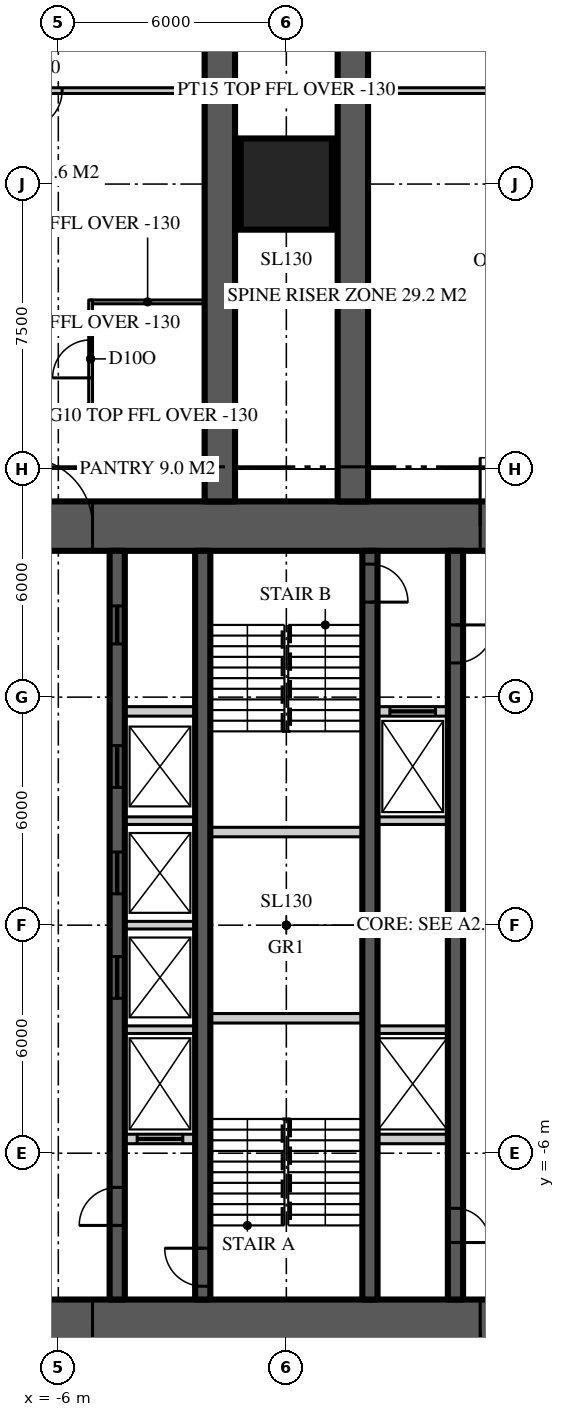
"""IFC4 building model, lengths in metres.
Left out: names, types, materials, properties, quantities, classifications, styles, units other than length and angle.
Written with IfcOpenShell. Run it as: python <this file> out.ifc"""

import sys

from ifc_helpers import new_model, si_unit, direction, frame, frame_2d, origin, origin_2d, place, context, subcontext, project, spatial, rectangle, extrude, element, fill, save


model = new_model("IFC4")
c1 = context("Model", 3, precision=1e-05, world=origin(), true_north=direction((0.0, 1.0)))
c2 = subcontext(c1, "Body", "Model", "MODEL_VIEW")
j1 = project(units=[si_unit("LENGTHUNIT", "METRE"), si_unit("PLANEANGLEUNIT", "RADIAN")], contexts=[c1])
p1 = place(None, origin())
s1 = spatial("IfcSite", under=j1, at=p1, CompositionType="ELEMENT")
p2 = place(p1, origin())
s2 = spatial("IfcBuilding", under=s1, at=p2, CompositionType="ELEMENT")
p3 = place(p2, frame((0.0, 0.0, 159.3)))
s3 = spatial("IfcBuildingStorey", under=s2, at=p3, CompositionType="ELEMENT", Elevation=159.3)
p4 = place(p3, frame((-11.15, 10.5, 0.0), z_axis=(0.0, 0.0, 1.0), x_axis=(1.0, 0.0, 0.0)))
e1 = element("IfcWall", 1, at=p4, inside=s3, PredefinedType="SHEAR", context=c2, shape_type="SweptSolid", body=[
    extrude(rectangle(XDim=22.3, YDim=1.3, at=frame_2d((11.15, 0.0))), origin(), (0.0, 0.0, 1.0), 3.9),
])
p5 = place(p4, frame((4.25, 0.0, 0.0)))
e2 = element("IfcOpeningElement", 2, at=p5, cuts=e1, PredefinedType="OPENING", context=c2, shape_type="SweptSolid", body=[
    extrude(rectangle(XDim=1.8, YDim=2.2, at=frame_2d((0.9, 1.1))), frame((0.0, 0.66, 0.0), z_axis=(0.0, -1.0, 0.0), x_axis=(1.0, 0.0, 0.0)), (0.0, 0.0, 1.0), 1.32),
])
p6 = place(p4, frame((16.25, 0.0, 0.0)))
e3 = element("IfcOpeningElement", 3, at=p6, cuts=e1, PredefinedType="OPENING", context=c2, shape_type="SweptSolid", body=[
    extrude(rectangle(XDim=1.8, YDim=2.2, at=frame_2d((0.9, 1.1))), frame((0.0, 0.66, 0.0), z_axis=(0.0, -1.0, 0.0), x_axis=(1.0, 0.0, 0.0)), (0.0, 0.0, 1.0), 1.32),
])
p7 = place(p3, frame((11.15, -10.5, 0.0), z_axis=(0.0, 0.0, 1.0), x_axis=(-1.0, 0.0, 0.0)))
e4 = element("IfcWall", 4, at=p7, inside=s3, PredefinedType="SHEAR", context=c2, shape_type="SweptSolid", body=[
    extrude(rectangle(XDim=22.3, YDim=1.3, at=frame_2d((11.15, 0.0))), origin(), (0.0, 0.0, 1.0), 3.9),
])
p8 = place(p7, frame((16.25, 0.0, 0.0)))
e5 = element("IfcOpeningElement", 5, at=p8, cuts=e4, PredefinedType="OPENING", context=c2, shape_type="SweptSolid", body=[
    extrude(rectangle(XDim=1.8, YDim=2.2, at=frame_2d((0.9, 1.1))), frame((0.0, 0.66, 0.0), z_axis=(0.0, -1.0, 0.0), x_axis=(1.0, 0.0, 0.0)), (0.0, 0.0, 1.0), 1.32),
])
p9 = place(p7, frame((4.25, 0.0, 0.0)))
e6 = element("IfcOpeningElement", 6, at=p9, cuts=e4, PredefinedType="OPENING", context=c2, shape_type="SweptSolid", body=[
    extrude(rectangle(XDim=1.8, YDim=2.2, at=frame_2d((0.9, 1.1))), frame((0.0, 0.66, 0.0), z_axis=(0.0, -1.0, 0.0), x_axis=(1.0, 0.0, 0.0)), (0.0, 0.0, 1.0), 1.32),
])
for number, where, z_axis, x_axis in (
    (7, (1.75, 11.15, 0.0), (0.0, 0.0, 1.0), (0.0, 1.0, 0.0)),
    (8, (-1.75, 11.15, 0.0), (0.0, 0.0, 1.0), (0.0, 1.0, 0.0)),
):
    element("IfcWall", number, at=place(p3, frame(where, z_axis=z_axis, x_axis=x_axis)), inside=s3, PredefinedType="SHEAR", context=c2, shape_type="SweptSolid", body=[
        extrude(rectangle(XDim=15.25, YDim=0.8, at=frame_2d((7.625, 0.0))), origin(), (0.0, 0.0, 1.0), 3.9),
    ])
p10 = place(p3, frame((0.0, 19.5, 0.0), z_axis=(0.0, 0.0, 1.0), x_axis=(1.0, 0.0, 0.0)))
e9 = element("IfcColumn", 9, at=p10, inside=s3, PredefinedType="COLUMN", context=c2, shape_type="SweptSolid", body=[
    extrude(rectangle(XDim=2.4, YDim=2.4, at=origin_2d()), origin(), (0.0, 0.0, 1.0), 3.9),
])
p11 = place(p3, frame((-4.45, -9.85, 0.0), z_axis=(0.0, 0.0, 1.0), x_axis=(0.0, 1.0, 0.0)))
e10 = element("IfcWall", 10, at=p11, inside=s3, PredefinedType="SHEAR", context=c2, shape_type="SweptSolid", body=[
    extrude(rectangle(XDim=19.7, YDim=0.4, at=frame_2d((9.85, 0.0))), origin(), (0.0, 0.0, 1.0), 3.9),
])
p12 = place(p11, frame((1.95, 0.0, 0.0)))
e11 = element("IfcOpeningElement", 11, at=p12, cuts=e10, PredefinedType="OPENING", context=c2, shape_type="SweptSolid", body=[
    extrude(rectangle(XDim=1.0, YDim=2.2, at=frame_2d((0.5, 1.1))), frame((0.0, 0.21, 0.0), z_axis=(0.0, -1.0, 0.0), x_axis=(1.0, 0.0, 0.0)), (0.0, 0.0, 1.0), 0.42),
])
p13 = place(p11, frame((17.25, 0.0, 0.0)))
e12 = element("IfcOpeningElement", 12, at=p13, cuts=e10, PredefinedType="OPENING", context=c2, shape_type="SweptSolid", body=[
    extrude(rectangle(XDim=1.0, YDim=2.1, at=frame_2d((0.5, 1.05))), frame((0.0, 0.21, 0.0), z_axis=(0.0, -1.0, 0.0), x_axis=(1.0, 0.0, 0.0)), (0.0, 0.0, 1.0), 0.42),
])
p14 = place(p11, frame((7.925, 0.0, 0.0)))
e13 = element("IfcOpeningElement", 13, at=p14, cuts=e10, PredefinedType="OPENING", context=c2, shape_type="SweptSolid", body=[
    extrude(rectangle(XDim=1.1, YDim=2.2, at=frame_2d((0.55, 1.1))), frame((0.0, 0.21, 0.0), z_axis=(0.0, -1.0, 0.0), x_axis=(1.0, 0.0, 0.0)), (0.0, 0.0, 1.0), 0.42),
])
p15 = place(p11, frame((10.675, 0.0, 0.0)))
e14 = element("IfcOpeningElement", 14, at=p15, cuts=e10, PredefinedType="OPENING", context=c2, shape_type="SweptSolid", body=[
    extrude(rectangle(XDim=1.1, YDim=2.2, at=frame_2d((0.55, 1.1))), frame((0.0, 0.21, 0.0), z_axis=(0.0, -1.0, 0.0), x_axis=(1.0, 0.0, 0.0)), (0.0, 0.0, 1.0), 0.42),
])
p16 = place(p11, frame((13.475, 0.0, 0.0)))
e15 = element("IfcOpeningElement", 15, at=p16, cuts=e10, PredefinedType="OPENING", context=c2, shape_type="SweptSolid", body=[
    extrude(rectangle(XDim=1.1, YDim=2.2, at=frame_2d((0.55, 1.1))), frame((0.0, 0.21, 0.0), z_axis=(0.0, -1.0, 0.0), x_axis=(1.0, 0.0, 0.0)), (0.0, 0.0, 1.0), 0.42),
])
p17 = place(p3, frame((4.45, 9.85, 0.0), z_axis=(0.0, 0.0, 1.0), x_axis=(0.0, -1.0, 0.0)))
e16 = element("IfcWall", 16, at=p17, inside=s3, PredefinedType="SHEAR", context=c2, shape_type="SweptSolid", body=[
    extrude(rectangle(XDim=19.7, YDim=0.4, at=frame_2d((9.85, 0.0))), origin(), (0.0, 0.0, 1.0), 3.9),
])
p18 = place(p17, frame((1.95, 0.0, 0.0)))
e17 = element("IfcOpeningElement", 17, at=p18, cuts=e16, PredefinedType="OPENING", context=c2, shape_type="SweptSolid", body=[
    extrude(rectangle(XDim=1.0, YDim=2.2, at=frame_2d((0.5, 1.1))), frame((0.0, 0.21, 0.0), z_axis=(0.0, -1.0, 0.0), x_axis=(1.0, 0.0, 0.0)), (0.0, 0.0, 1.0), 0.42),
])
p19 = place(p17, frame((17.3, 0.0, 0.0)))
e18 = element("IfcOpeningElement", 18, at=p19, cuts=e16, PredefinedType="OPENING", context=c2, shape_type="SweptSolid", body=[
    extrude(rectangle(XDim=0.9, YDim=2.1, at=frame_2d((0.45, 1.05))), frame((0.0, 0.21, 0.0), z_axis=(0.0, -1.0, 0.0), x_axis=(1.0, 0.0, 0.0)), (0.0, 0.0, 1.0), 0.42),
])
p20 = place(p3, frame((-2.2, -9.85, 0.0), z_axis=(0.0, 0.0, 1.0), x_axis=(0.0, 1.0, 0.0)))
e19 = element("IfcWall", 19, at=p20, inside=s3, PredefinedType="SHEAR", context=c2, shape_type="SweptSolid", body=[
    extrude(rectangle(XDim=19.7, YDim=0.4, at=frame_2d((9.85, 0.0))), origin(), (0.0, 0.0, 1.0), 3.9),
])
p21 = place(p20, frame((0.35, 0.0, 0.0)))
e20 = element("IfcOpeningElement", 20, at=p21, cuts=e19, PredefinedType="OPENING", context=c2, shape_type="SweptSolid", body=[
    extrude(rectangle(XDim=1.0, YDim=2.2, at=frame_2d((0.5, 1.1))), frame((0.0, 0.21, 0.0), z_axis=(0.0, -1.0, 0.0), x_axis=(1.0, 0.0, 0.0)), (0.0, 0.0, 1.0), 0.42),
])
p22 = place(p3, frame((2.2, 9.85, 0.0), z_axis=(0.0, 0.0, 1.0), x_axis=(0.0, -1.0, 0.0)))
e21 = element("IfcWall", 21, at=p22, inside=s3, PredefinedType="SHEAR", context=c2, shape_type="SweptSolid", body=[
    extrude(rectangle(XDim=19.7, YDim=0.4, at=frame_2d((9.85, 0.0))), origin(), (0.0, 0.0, 1.0), 3.9),
])
p23 = place(p22, frame((0.35, 0.0, 0.0)))
e22 = element("IfcOpeningElement", 22, at=p23, cuts=e21, PredefinedType="OPENING", context=c2, shape_type="SweptSolid", body=[
    extrude(rectangle(XDim=1.0, YDim=2.2, at=frame_2d((0.5, 1.1))), frame((0.0, 0.21, 0.0), z_axis=(0.0, -1.0, 0.0), x_axis=(1.0, 0.0, 0.0)), (0.0, 0.0, 1.0), 0.42),
])
p24 = place(p3, frame((-4.25, 5.625, 0.0), z_axis=(0.0, 0.0, 1.0), x_axis=(1.0, 0.0, 0.0)))
e23 = element("IfcWall", 23, at=p24, inside=s3, PredefinedType="SOLIDWALL", context=c2, shape_type="SweptSolid", body=[
    extrude(rectangle(XDim=1.85, YDim=0.25, at=frame_2d((0.925, 0.0))), origin(), (0.0, 0.0, 1.0), 3.7),
])
p25 = place(p3, frame((2.4, 5.625, 0.0), z_axis=(0.0, 0.0, 1.0), x_axis=(1.0, 0.0, 0.0)))
e24 = element("IfcWall", 24, at=p25, inside=s3, PredefinedType="SOLIDWALL", context=c2, shape_type="SweptSolid", body=[
    extrude(rectangle(XDim=1.85, YDim=0.25, at=frame_2d((0.925, 0.0))), origin(), (0.0, 0.0, 1.0), 3.7),
])
p26 = place(p25, frame((0.325, 0.0, 0.0)))
e25 = element("IfcOpeningElement", 25, at=p26, cuts=e24, PredefinedType="OPENING", context=c2, shape_type="SweptSolid", body=[
    extrude(rectangle(XDim=1.2, YDim=2.2, at=frame_2d((0.6, 1.1))), frame((0.0, 0.135, 0.0), z_axis=(0.0, -1.0, 0.0), x_axis=(1.0, 0.0, 0.0)), (0.0, 0.0, 1.0), 0.27),
])
p27 = place(p3, frame((-4.25, -5.625, 0.0), z_axis=(0.0, 0.0, 1.0), x_axis=(1.0, 0.0, 0.0)))
e26 = element("IfcWall", 26, at=p27, inside=s3, PredefinedType="SOLIDWALL", context=c2, shape_type="SweptSolid", body=[
    extrude(rectangle(XDim=1.85, YDim=0.25, at=frame_2d((0.925, 0.0))), origin(), (0.0, 0.0, 1.0), 3.7),
])
p28 = place(p27, frame((0.325, 0.0, 0.0)))
e27 = element("IfcOpeningElement", 27, at=p28, cuts=e26, PredefinedType="OPENING", context=c2, shape_type="SweptSolid", body=[
    extrude(rectangle(XDim=1.2, YDim=2.2, at=frame_2d((0.6, 1.1))), frame((0.0, 0.135, 0.0), z_axis=(0.0, -1.0, 0.0), x_axis=(1.0, 0.0, 0.0)), (0.0, 0.0, 1.0), 0.27),
])
p29 = place(p3, frame((2.4, -5.625, 0.0), z_axis=(0.0, 0.0, 1.0), x_axis=(1.0, 0.0, 0.0)))
e28 = element("IfcWall", 28, at=p29, inside=s3, PredefinedType="SOLIDWALL", context=c2, shape_type="SweptSolid", body=[
    extrude(rectangle(XDim=1.85, YDim=0.25, at=frame_2d((0.925, 0.0))), origin(), (0.0, 0.0, 1.0), 3.7),
])
for number, where, z_axis, x_axis in (
    (29, (-2.0, -2.45, 0.0), (0.0, 0.0, 1.0), (1.0, 0.0, 0.0)),
    (30, (-2.0, 2.45, 0.0), (0.0, 0.0, 1.0), (1.0, 0.0, 0.0)),
):
    element("IfcWall", number, at=place(p3, frame(where, z_axis=z_axis, x_axis=x_axis)), inside=s3, PredefinedType="SOLIDWALL", context=c2, shape_type="SweptSolid", body=[
        extrude(rectangle(XDim=4.0, YDim=0.25, at=frame_2d((2.0, 0.0))), origin(), (0.0, 0.0, 1.0), 3.7),
    ])
for number, where, z_axis, x_axis in (
    (31, (-4.25, -2.75, 0.0), (0.0, 0.0, 1.0), (1.0, 0.0, 0.0)),
    (32, (2.4, -2.75, 0.0), (0.0, 0.0, 1.0), (1.0, 0.0, 0.0)),
    (33, (-4.25, 0.0, 0.0), (0.0, 0.0, 1.0), (1.0, 0.0, 0.0)),
    (34, (-4.25, 2.75, 0.0), (0.0, 0.0, 1.0), (1.0, 0.0, 0.0)),
    (35, (2.4, 2.75, 0.0), (0.0, 0.0, 1.0), (1.0, 0.0, 0.0)),
):
    element("IfcWall", number, at=place(p3, frame(where, z_axis=z_axis, x_axis=x_axis)), inside=s3, PredefinedType="SOLIDWALL", context=c2, shape_type="SweptSolid", body=[
        extrude(rectangle(XDim=1.85, YDim=0.2, at=frame_2d((0.925, 0.0))), origin(), (0.0, 0.0, 1.0), 3.7),
    ])
p30 = place(p3, frame((12.786, 21.959, 0.0), z_axis=(0.0, 0.0, 1.0), x_axis=(-1.0, 0.0, 0.0)))
e36 = element("IfcWall", 36, at=p30, inside=s3, PredefinedType="PARTITIONING", context=c2, shape_type="SweptSolid", body=[
    extrude(rectangle(XDim=25.573, YDim=0.15, at=frame_2d((12.786, 0.0))), origin(), (0.0, 0.0, 1.0), 3.77),
])
p31 = place(p30, frame((18.687, 0.0, 0.0)))
e37 = element("IfcOpeningElement", 37, at=p31, cuts=e36, PredefinedType="OPENING", context=c2, shape_type="SweptSolid", body=[
    extrude(rectangle(XDim=1.0, YDim=2.2, at=frame_2d((0.5, 1.1))), frame((0.0, 0.085, 0.0), z_axis=(0.0, -1.0, 0.0), x_axis=(1.0, 0.0, 0.0)), (0.0, 0.0, 1.0), 0.17),
])
p32 = place(p30, frame((5.886, 0.0, 0.0)))
e38 = element("IfcOpeningElement", 38, at=p32, cuts=e36, PredefinedType="OPENING", context=c2, shape_type="SweptSolid", body=[
    extrude(rectangle(XDim=1.0, YDim=2.2, at=frame_2d((0.5, 1.1))), frame((0.0, 0.085, 0.0), z_axis=(0.0, -1.0, 0.0), x_axis=(1.0, 0.0, 0.0)), (0.0, 0.0, 1.0), 0.17),
])
for number, where, z_axis, x_axis in (
    (39, (-2.15, 13.4, 0.0), (0.0, 0.0, 1.0), (-1.0, 0.0, 0.0)),
    (40, (-2.15, 16.4, 0.0), (0.0, 0.0, 1.0), (-1.0, 0.0, 0.0)),
):
    element("IfcWall", number, at=place(p3, frame(where, z_axis=z_axis, x_axis=x_axis)), inside=s3, PredefinedType="PARTITIONING", context=c2, shape_type="SweptSolid", body=[
        extrude(rectangle(XDim=3.0, YDim=0.1, at=frame_2d((1.5, 0.0))), origin(), (0.0, 0.0, 1.0), 3.77),
    ])
p33 = place(p3, frame((-5.15, 13.35, 0.0), z_axis=(0.0, 0.0, 1.0), x_axis=(0.0, 1.0, 0.0)))
e41 = element("IfcWall", 41, at=p33, inside=s3, PredefinedType="PARTITIONING", context=c2, shape_type="SweptSolid", body=[
    extrude(rectangle(XDim=3.1, YDim=0.1, at=frame_2d((1.55, 0.0))), origin(), (0.0, 0.0, 1.0), 3.77),
])
p34 = place(p33, frame((1.05, 0.0, 0.0)))
e42 = element("IfcOpeningElement", 42, at=p34, cuts=e41, PredefinedType="OPENING", context=c2, shape_type="SweptSolid", body=[
    extrude(rectangle(XDim=1.0, YDim=2.2, at=frame_2d((0.5, 1.1))), frame((0.0, 0.06, 0.0), z_axis=(0.0, -1.0, 0.0), x_axis=(1.0, 0.0, 0.0)), (0.0, 0.0, 1.0), 0.12),
])
p35 = place(p5, origin())
e43 = element("IfcDoor", 43, at=p35, inside=s3, OperationType="DOUBLE_DOOR_DOUBLE_SWING", PredefinedType="DOOR", context=c2, shape_type="SweptSolid", body=[
    extrude(rectangle(XDim=1.8, YDim=2.2, at=frame_2d((0.9, 1.1))), frame((0.0, 0.025, 0.0), z_axis=(0.0, -1.0, 0.0), x_axis=(1.0, 0.0, 0.0)), (0.0, 0.0, 1.0), 0.05),
])
fill(e2, e43)
p36 = place(p8, origin())
e44 = element("IfcDoor", 44, at=p36, inside=s3, OperationType="DOUBLE_DOOR_DOUBLE_SWING", PredefinedType="DOOR", context=c2, shape_type="SweptSolid", body=[
    extrude(rectangle(XDim=1.8, YDim=2.2, at=frame_2d((0.9, 1.1))), frame((0.0, 0.025, 0.0), z_axis=(0.0, -1.0, 0.0), x_axis=(1.0, 0.0, 0.0)), (0.0, 0.0, 1.0), 0.05),
])
fill(e5, e44)
p37 = place(p6, origin())
e45 = element("IfcDoor", 45, at=p37, inside=s3, OperationType="DOUBLE_DOOR_DOUBLE_SWING", PredefinedType="DOOR", context=c2, shape_type="SweptSolid", body=[
    extrude(rectangle(XDim=1.8, YDim=2.2, at=frame_2d((0.9, 1.1))), frame((0.0, 0.025, 0.0), z_axis=(0.0, -1.0, 0.0), x_axis=(1.0, 0.0, 0.0)), (0.0, 0.0, 1.0), 0.05),
])
fill(e3, e45)
p38 = place(p9, origin())
e46 = element("IfcDoor", 46, at=p38, inside=s3, OperationType="DOUBLE_DOOR_DOUBLE_SWING", PredefinedType="DOOR", context=c2, shape_type="SweptSolid", body=[
    extrude(rectangle(XDim=1.8, YDim=2.2, at=frame_2d((0.9, 1.1))), frame((0.0, 0.025, 0.0), z_axis=(0.0, -1.0, 0.0), x_axis=(1.0, 0.0, 0.0)), (0.0, 0.0, 1.0), 0.05),
])
fill(e6, e46)
p39 = place(p12, origin())
e47 = element("IfcDoor", 47, at=p39, inside=s3, OperationType="SINGLE_SWING_LEFT", PredefinedType="DOOR", context=c2, shape_type="SweptSolid", body=[
    extrude(rectangle(XDim=1.0, YDim=2.2, at=frame_2d((0.5, 1.1))), frame((0.0, 0.025, 0.0), z_axis=(0.0, -1.0, 0.0), x_axis=(1.0, 0.0, 0.0)), (0.0, 0.0, 1.0), 0.05),
])
fill(e11, e47)
p40 = place(p21, origin())
e48 = element("IfcDoor", 48, at=p40, inside=s3, OperationType="SINGLE_SWING_RIGHT", PredefinedType="DOOR", context=c2, shape_type="SweptSolid", body=[
    extrude(rectangle(XDim=1.0, YDim=2.2, at=frame_2d((0.5, 1.1))), frame((0.0, 0.025, 0.0), z_axis=(0.0, -1.0, 0.0), x_axis=(1.0, 0.0, 0.0)), (0.0, 0.0, 1.0), 0.05),
])
fill(e20, e48)
p41 = place(p18, origin())
e49 = element("IfcDoor", 49, at=p41, inside=s3, OperationType="SINGLE_SWING_LEFT", PredefinedType="DOOR", context=c2, shape_type="SweptSolid", body=[
    extrude(rectangle(XDim=1.0, YDim=2.2, at=frame_2d((0.5, 1.1))), frame((0.0, 0.025, 0.0), z_axis=(0.0, -1.0, 0.0), x_axis=(1.0, 0.0, 0.0)), (0.0, 0.0, 1.0), 0.05),
])
fill(e17, e49)
p42 = place(p23, origin())
e50 = element("IfcDoor", 50, at=p42, inside=s3, OperationType="SINGLE_SWING_RIGHT", PredefinedType="DOOR", context=c2, shape_type="SweptSolid", body=[
    extrude(rectangle(XDim=1.0, YDim=2.2, at=frame_2d((0.5, 1.1))), frame((0.0, 0.025, 0.0), z_axis=(0.0, -1.0, 0.0), x_axis=(1.0, 0.0, 0.0)), (0.0, 0.0, 1.0), 0.05),
])
fill(e22, e50)
p43 = place(p13, origin())
e51 = element("IfcDoor", 51, at=p43, inside=s3, OperationType="SLIDING_TO_LEFT", PredefinedType="DOOR", context=c2, shape_type="SweptSolid", body=[
    extrude(rectangle(XDim=1.0, YDim=2.1, at=frame_2d((0.5, 1.05))), frame((0.0, 0.025, 0.0), z_axis=(0.0, -1.0, 0.0), x_axis=(1.0, 0.0, 0.0)), (0.0, 0.0, 1.0), 0.05),
])
fill(e12, e51)
p44 = place(p19, origin())
e52 = element("IfcDoor", 52, at=p44, inside=s3, OperationType="SINGLE_SWING_RIGHT", PredefinedType="DOOR", context=c2, shape_type="SweptSolid", body=[
    extrude(rectangle(XDim=0.9, YDim=2.1, at=frame_2d((0.45, 1.05))), frame((0.0, 0.025, 0.0), z_axis=(0.0, -1.0, 0.0), x_axis=(1.0, 0.0, 0.0)), (0.0, 0.0, 1.0), 0.05),
])
fill(e18, e52)
p45 = place(p14, origin())
e53 = element("IfcDoor", 53, at=p45, inside=s3, OperationType="SLIDING_TO_LEFT", PredefinedType="DOOR", context=c2, shape_type="SweptSolid", body=[
    extrude(rectangle(XDim=1.1, YDim=2.2, at=frame_2d((0.55, 1.1))), frame((0.0, 0.025, 0.0), z_axis=(0.0, -1.0, 0.0), x_axis=(1.0, 0.0, 0.0)), (0.0, 0.0, 1.0), 0.05),
])
fill(e13, e53)
p46 = place(p15, origin())
e54 = element("IfcDoor", 54, at=p46, inside=s3, OperationType="SLIDING_TO_LEFT", PredefinedType="DOOR", context=c2, shape_type="SweptSolid", body=[
    extrude(rectangle(XDim=1.1, YDim=2.2, at=frame_2d((0.55, 1.1))), frame((0.0, 0.025, 0.0), z_axis=(0.0, -1.0, 0.0), x_axis=(1.0, 0.0, 0.0)), (0.0, 0.0, 1.0), 0.05),
])
fill(e14, e54)
p47 = place(p16, origin())
e55 = element("IfcDoor", 55, at=p47, inside=s3, OperationType="SLIDING_TO_LEFT", PredefinedType="DOOR", context=c2, shape_type="SweptSolid", body=[
    extrude(rectangle(XDim=1.1, YDim=2.2, at=frame_2d((0.55, 1.1))), frame((0.0, 0.025, 0.0), z_axis=(0.0, -1.0, 0.0), x_axis=(1.0, 0.0, 0.0)), (0.0, 0.0, 1.0), 0.05),
])
fill(e15, e55)
p48 = place(p28, origin())
e56 = element("IfcDoor", 56, at=p48, inside=s3, OperationType="SLIDING_TO_LEFT", PredefinedType="DOOR", context=c2, shape_type="SweptSolid", body=[
    extrude(rectangle(XDim=1.2, YDim=2.2, at=frame_2d((0.6, 1.1))), frame((0.0, 0.025, 0.0), z_axis=(0.0, -1.0, 0.0), x_axis=(1.0, 0.0, 0.0)), (0.0, 0.0, 1.0), 0.05),
])
fill(e27, e56)
p49 = place(p26, origin())
e57 = element("IfcDoor", 57, at=p49, inside=s3, OperationType="SLIDING_TO_LEFT", PredefinedType="DOOR", context=c2, shape_type="SweptSolid", body=[
    extrude(rectangle(XDim=1.2, YDim=2.2, at=frame_2d((0.6, 1.1))), frame((0.0, 0.025, 0.0), z_axis=(0.0, -1.0, 0.0), x_axis=(1.0, 0.0, 0.0)), (0.0, 0.0, 1.0), 0.05),
])
fill(e25, e57)
p50 = place(p31, origin())
e58 = element("IfcDoor", 58, at=p50, inside=s3, OperationType="SINGLE_SWING_RIGHT", PredefinedType="DOOR", context=c2, shape_type="SweptSolid", body=[
    extrude(rectangle(XDim=1.0, YDim=2.2, at=frame_2d((0.5, 1.1))), frame((0.0, 0.025, 0.0), z_axis=(0.0, -1.0, 0.0), x_axis=(1.0, 0.0, 0.0)), (0.0, 0.0, 1.0), 0.05),
])
fill(e37, e58)
p51 = place(p34, origin())
e59 = element("IfcDoor", 59, at=p51, inside=s3, OperationType="SINGLE_SWING_LEFT", PredefinedType="DOOR", context=c2, shape_type="SweptSolid", body=[
    extrude(rectangle(XDim=1.0, YDim=2.2, at=frame_2d((0.5, 1.1))), frame((0.0, 0.025, 0.0), z_axis=(0.0, -1.0, 0.0), x_axis=(1.0, 0.0, 0.0)), (0.0, 0.0, 1.0), 0.05),
])
fill(e42, e59)
save(model, sys.argv[1])
